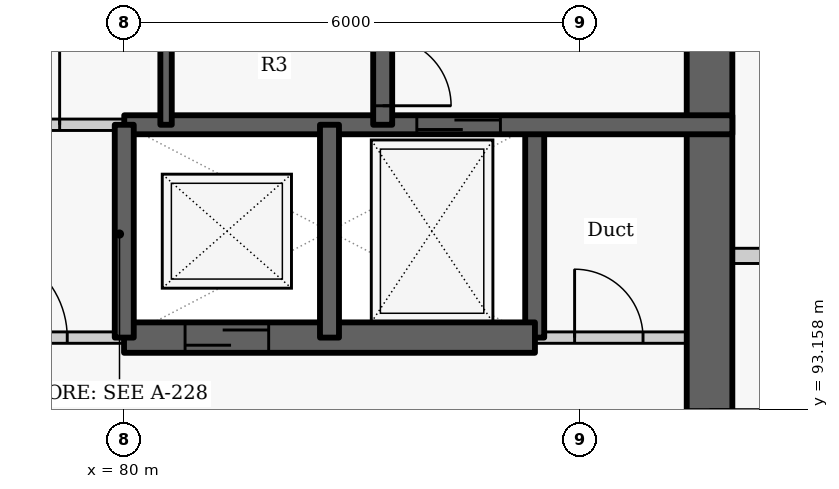
"""IFC4 building model, lengths in metres.
Left out: names, types, materials, properties, quantities, classifications, styles, units other than length and angle.
Written with IfcOpenShell. Run it as: python <this file> out.ifc"""

import sys

from ifc_helpers import new_model, si_unit, direction, frame, frame_2d, origin, place, context, subcontext, project, spatial, rectangle, extrude, element, fill, save


model = new_model("IFC4")
c1 = context("Model", 3, precision=1e-05, world=origin(), true_north=direction((0.0, 1.0)))
c2 = subcontext(c1, "Body", "Model", "MODEL_VIEW")
j1 = project(units=[si_unit("LENGTHUNIT", "METRE"), si_unit("PLANEANGLEUNIT", "RADIAN")], contexts=[c1])
p1 = place(None, origin())
s1 = spatial("IfcSite", under=j1, at=p1, CompositionType="ELEMENT")
p2 = place(p1, origin())
s2 = spatial("IfcBuilding", under=s1, at=p2, CompositionType="ELEMENT")
p3 = place(p2, frame((0.0, 0.0, 160.2)))
s3 = spatial("IfcBuildingStorey", under=s2, at=p3, CompositionType="ELEMENT", Elevation=160.2)
p4 = place(p3, frame((85.4, 94.1, -0.275), z_axis=(0.0, 0.0, 1.0), x_axis=(0.0, 1.0, 0.0)))
e1 = element("IfcWall", 1, at=p4, inside=s3, PredefinedType="SHEAR", context=c2, shape_type="SweptSolid", body=[
    extrude(rectangle(XDim=2.8, YDim=0.25, at=frame_2d((1.4, 0.0))), origin(), (0.0, 0.0, 1.0), 3.3),
])
p5 = place(p3, frame((87.7, 103.4, -0.275), z_axis=(0.0, 0.0, 1.0), x_axis=(0.0, -1.0, 0.0)))
e2 = element("IfcWall", 2, at=p5, inside=s3, PredefinedType="SHEAR", context=c2, shape_type="SweptSolid", body=[
    extrude(rectangle(XDim=15.6, YDim=0.6, at=frame_2d((7.8, 0.0))), origin(), (0.0, 0.0, 1.0), 3.3),
])
p6 = place(p5, frame((10.248, 0.0, 0.275)))
e3 = element("IfcOpeningElement", 3, at=p6, cuts=e2, PredefinedType="OPENING", context=c2, shape_type="SweptSolid", body=[
    extrude(rectangle(XDim=1.5, YDim=2.1, at=frame_2d((0.75, 1.05))), frame((0.0, 0.31, 0.0), z_axis=(0.0, -1.0, 0.0), x_axis=(1.0, 0.0, 0.0)), (0.0, 0.0, 1.0), 0.62),
])
p7 = place(p3, frame((77.297, 94.1, 0.0), z_axis=(0.0, 0.0, 1.0), x_axis=(1.0, 0.0, 0.0)))
e4 = element("IfcWall", 4, at=p7, inside=s3, PredefinedType="PARTITIONING", context=c2, shape_type="SweptSolid", body=[
    extrude(rectangle(XDim=2.706, YDim=0.15, at=frame_2d((1.353, 0.0))), origin(), (0.0, 0.0, 1.0), 3.025),
])
p8 = place(p7, frame((0.753, 0.0, 0.0)))
e5 = element("IfcOpeningElement", 5, at=p8, cuts=e4, PredefinedType="OPENING", context=c2, shape_type="SweptSolid", body=[
    extrude(rectangle(XDim=1.2, YDim=2.1, at=frame_2d((0.6, 1.05))), frame((0.0, 0.085, 0.0), z_axis=(0.0, -1.0, 0.0), x_axis=(1.0, 0.0, 0.0)), (0.0, 0.0, 1.0), 0.17),
])
p9 = place(p3, frame((85.397, 94.1, 0.0), z_axis=(0.0, 0.0, 1.0), x_axis=(1.0, 0.0, 0.0)))
e6 = element("IfcWall", 6, at=p9, inside=s3, PredefinedType="PARTITIONING", context=c2, shape_type="SweptSolid", body=[
    extrude(rectangle(XDim=2.603, YDim=0.15, at=frame_2d((1.302, 0.0))), origin(), (0.0, 0.0, 1.0), 3.025),
])
p10 = place(p9, frame((0.528, 0.0, 0.0)))
e7 = element("IfcOpeningElement", 7, at=p10, cuts=e6, PredefinedType="OPENING", context=c2, shape_type="SweptSolid", body=[
    extrude(rectangle(XDim=0.9, YDim=2.1, at=frame_2d((0.45, 1.05))), frame((0.0, 0.085, 0.0), z_axis=(0.0, -1.0, 0.0), x_axis=(1.0, 0.0, 0.0)), (0.0, 0.0, 1.0), 0.17),
])
p11 = place(p3, frame((79.997, 94.1, -0.275), z_axis=(0.0, 0.0, 1.0), x_axis=(1.0, 0.0, 0.0)))
e8 = element("IfcWall", 8, at=p11, inside=s3, PredefinedType="SHEAR", context=c2, shape_type="SweptSolid", body=[
    extrude(rectangle(XDim=5.406, YDim=0.4, at=frame_2d((2.703, 0.0))), origin(), (0.0, 0.0, 1.0), 3.3),
])
p12 = place(p11, frame((0.803, 0.0, 0.275)))
e9 = element("IfcOpeningElement", 9, at=p12, cuts=e8, PredefinedType="OPENING", context=c2, shape_type="SweptSolid", body=[
    extrude(rectangle(XDim=1.1, YDim=2.1, at=frame_2d((0.55, 1.05))), frame((0.0, 0.21, 0.0), z_axis=(0.0, -1.0, 0.0), x_axis=(1.0, 0.0, 0.0)), (0.0, 0.0, 1.0), 0.42),
])
p13 = place(p3, frame((80.0, 96.9, -0.275), z_axis=(0.0, 0.0, 1.0), x_axis=(1.0, 0.0, 0.0)))
e10 = element("IfcWall", 10, at=p13, inside=s3, PredefinedType="SHEAR", context=c2, shape_type="SweptSolid", body=[
    extrude(rectangle(XDim=8.0, YDim=0.25, at=frame_2d((4.0, 0.0))), origin(), (0.0, 0.0, 1.0), 3.3),
])
p14 = place(p13, frame((3.849, 0.0, 0.275)))
e11 = element("IfcOpeningElement", 11, at=p14, cuts=e10, PredefinedType="OPENING", context=c2, shape_type="SweptSolid", body=[
    extrude(rectangle(XDim=1.1, YDim=2.1, at=frame_2d((0.55, 1.05))), frame((0.0, 0.135, 0.0), z_axis=(0.0, -1.0, 0.0), x_axis=(1.0, 0.0, 0.0)), (0.0, 0.0, 1.0), 0.27),
])
p15 = place(p3, frame((80.0, 94.1, -0.275), z_axis=(0.0, 0.0, 1.0), x_axis=(0.0, 1.0, 0.0)))
e12 = element("IfcWall", 12, at=p15, inside=s3, PredefinedType="SHEAR", context=c2, shape_type="SweptSolid", body=[
    extrude(rectangle(XDim=2.8, YDim=0.25, at=frame_2d((1.4, 0.0))), origin(), (0.0, 0.0, 1.0), 3.3),
])
p16 = place(p3, frame((77.3, 96.9, 0.0), z_axis=(0.0, 0.0, 1.0), x_axis=(1.0, 0.0, 0.0)))
e13 = element("IfcWall", 13, at=p16, inside=s3, PredefinedType="PARTITIONING", context=c2, shape_type="SweptSolid", body=[
    extrude(rectangle(XDim=2.7, YDim=0.15, at=frame_2d((1.35, 0.0))), origin(), (0.0, 0.0, 1.0), 3.025),
])
p17 = place(p16, frame((0.85, 0.0, 0.0)))
e14 = element("IfcOpeningElement", 14, at=p17, cuts=e13, PredefinedType="OPENING", context=c2, shape_type="SweptSolid", body=[
    extrude(rectangle(XDim=1.0, YDim=2.1, at=frame_2d((0.5, 1.05))), frame((0.0, 0.085, 0.0), z_axis=(0.0, -1.0, 0.0), x_axis=(1.0, 0.0, 0.0)), (0.0, 0.0, 1.0), 0.17),
])
p18 = place(p3, frame((82.7, 94.1, -0.275), z_axis=(0.0, 0.0, 1.0), x_axis=(0.0, 1.0, 0.0)))
e15 = element("IfcWall", 15, at=p18, inside=s3, PredefinedType="SHEAR", context=c2, shape_type="SweptSolid", body=[
    extrude(rectangle(XDim=2.8, YDim=0.25, at=frame_2d((1.4, 0.0))), origin(), (0.0, 0.0, 1.0), 3.3),
])
p19 = place(p3, frame((83.4, 103.4, -0.275), z_axis=(0.0, 0.0, 1.0), x_axis=(0.0, -1.0, 0.0)))
e16 = element("IfcWall", 16, at=p19, inside=s3, PredefinedType="SHEAR", context=c2, shape_type="SweptSolid", body=[
    extrude(rectangle(XDim=6.5, YDim=0.25, at=frame_2d((3.25, 0.0))), origin(), (0.0, 0.0, 1.0), 3.3),
])
p20 = place(p19, frame((5.35, 0.0, 0.275)))
e17 = element("IfcOpeningElement", 17, at=p20, cuts=e16, PredefinedType="OPENING", context=c2, shape_type="SweptSolid", body=[
    extrude(rectangle(XDim=0.9, YDim=2.1, at=frame_2d((0.45, 1.05))), frame((0.0, 0.135, 0.0), z_axis=(0.0, -1.0, 0.0), x_axis=(1.0, 0.0, 0.0)), (0.0, 0.0, 1.0), 0.27),
])
p21 = place(p3, frame((80.55, 96.9, -0.275), z_axis=(0.0, 0.0, 1.0), x_axis=(0.0, 1.0, 0.0)))
e18 = element("IfcWall", 18, at=p21, inside=s3, PredefinedType="SHEAR", context=c2, shape_type="SweptSolid", body=[
    extrude(rectangle(XDim=1.503, YDim=0.15, at=frame_2d((0.751, 0.0))), origin(), (0.0, 0.0, 1.0), 3.3),
])
p22 = place(p3, frame((88.0, 95.175, 0.0), z_axis=(0.0, 0.0, 1.0), x_axis=(1.0, 0.0, 0.0)))
e19 = element("IfcWall", 19, at=p22, inside=s3, PredefinedType="PARTITIONING", context=c2, shape_type="SweptSolid", body=[
    extrude(rectangle(XDim=1.423, YDim=0.2, at=frame_2d((0.711, 0.0))), origin(), (0.0, 0.0, 1.0), 3.025),
])
p23 = place(p8, origin())
e20 = element("IfcDoor", 20, at=p23, inside=s3, OperationType="DOUBLE_DOOR_SINGLE_SWING", PredefinedType="DOOR", context=c2, shape_type="SweptSolid", body=[
    extrude(rectangle(XDim=1.2, YDim=2.1, at=frame_2d((0.6, 1.05))), frame((0.0, 0.025, 0.0), z_axis=(0.0, -1.0, 0.0), x_axis=(1.0, 0.0, 0.0)), (0.0, 0.0, 1.0), 0.05),
])
fill(e5, e20)
p24 = place(p12, origin())
e21 = element("IfcDoor", 21, at=p24, inside=s3, OperationType="SLIDING_TO_LEFT", PredefinedType="DOOR", context=c2, shape_type="SweptSolid", body=[
    extrude(rectangle(XDim=1.1, YDim=2.1, at=frame_2d((0.55, 1.05))), frame((0.0, 0.025, 0.0), z_axis=(0.0, -1.0, 0.0), x_axis=(1.0, 0.0, 0.0)), (0.0, 0.0, 1.0), 0.05),
])
fill(e9, e21)
p25 = place(p14, origin())
e22 = element("IfcDoor", 22, at=p25, inside=s3, OperationType="SLIDING_TO_LEFT", PredefinedType="DOOR", context=c2, shape_type="SweptSolid", body=[
    extrude(rectangle(XDim=1.1, YDim=2.1, at=frame_2d((0.55, 1.05))), frame((0.0, 0.025, 0.0), z_axis=(0.0, -1.0, 0.0), x_axis=(1.0, 0.0, 0.0)), (0.0, 0.0, 1.0), 0.05),
])
fill(e11, e22)
p26 = place(p10, origin())
e23 = element("IfcDoor", 23, at=p26, inside=s3, OperationType="SINGLE_SWING_LEFT", PredefinedType="DOOR", context=c2, shape_type="SweptSolid", body=[
    extrude(rectangle(XDim=0.9, YDim=2.1, at=frame_2d((0.45, 1.05))), frame((0.0, 0.025, 0.0), z_axis=(0.0, -1.0, 0.0), x_axis=(1.0, 0.0, 0.0)), (0.0, 0.0, 1.0), 0.05),
])
fill(e7, e23)
p27 = place(p17, origin())
e24 = element("IfcDoor", 24, at=p27, inside=s3, OperationType="SINGLE_SWING_RIGHT", PredefinedType="DOOR", context=c2, shape_type="SweptSolid", body=[
    extrude(rectangle(XDim=1.0, YDim=2.1, at=frame_2d((0.5, 1.05))), frame((0.0, 0.025, 0.0), z_axis=(0.0, -1.0, 0.0), x_axis=(1.0, 0.0, 0.0)), (0.0, 0.0, 1.0), 0.05),
])
fill(e14, e24)
p28 = place(p20, origin())
e25 = element("IfcDoor", 25, at=p28, inside=s3, OperationType="SINGLE_SWING_RIGHT", PredefinedType="DOOR", context=c2, shape_type="SweptSolid", body=[
    extrude(rectangle(XDim=0.9, YDim=2.1, at=frame_2d((0.45, 1.05))), frame((0.0, 0.025, 0.0), z_axis=(0.0, -1.0, 0.0), x_axis=(1.0, 0.0, 0.0)), (0.0, 0.0, 1.0), 0.05),
])
fill(e17, e25)
p29 = place(p6, origin())
e26 = element("IfcDoor", 26, at=p29, inside=s3, OperationType="DOUBLE_DOOR_SINGLE_SWING", PredefinedType="DOOR", context=c2, shape_type="SweptSolid", body=[
    extrude(rectangle(XDim=1.5, YDim=2.1, at=frame_2d((0.75, 1.05))), frame((0.0, 0.025, 0.0), z_axis=(0.0, -1.0, 0.0), x_axis=(1.0, 0.0, 0.0)), (0.0, 0.0, 1.0), 0.05),
])
fill(e3, e26)
save(model, sys.argv[1])
